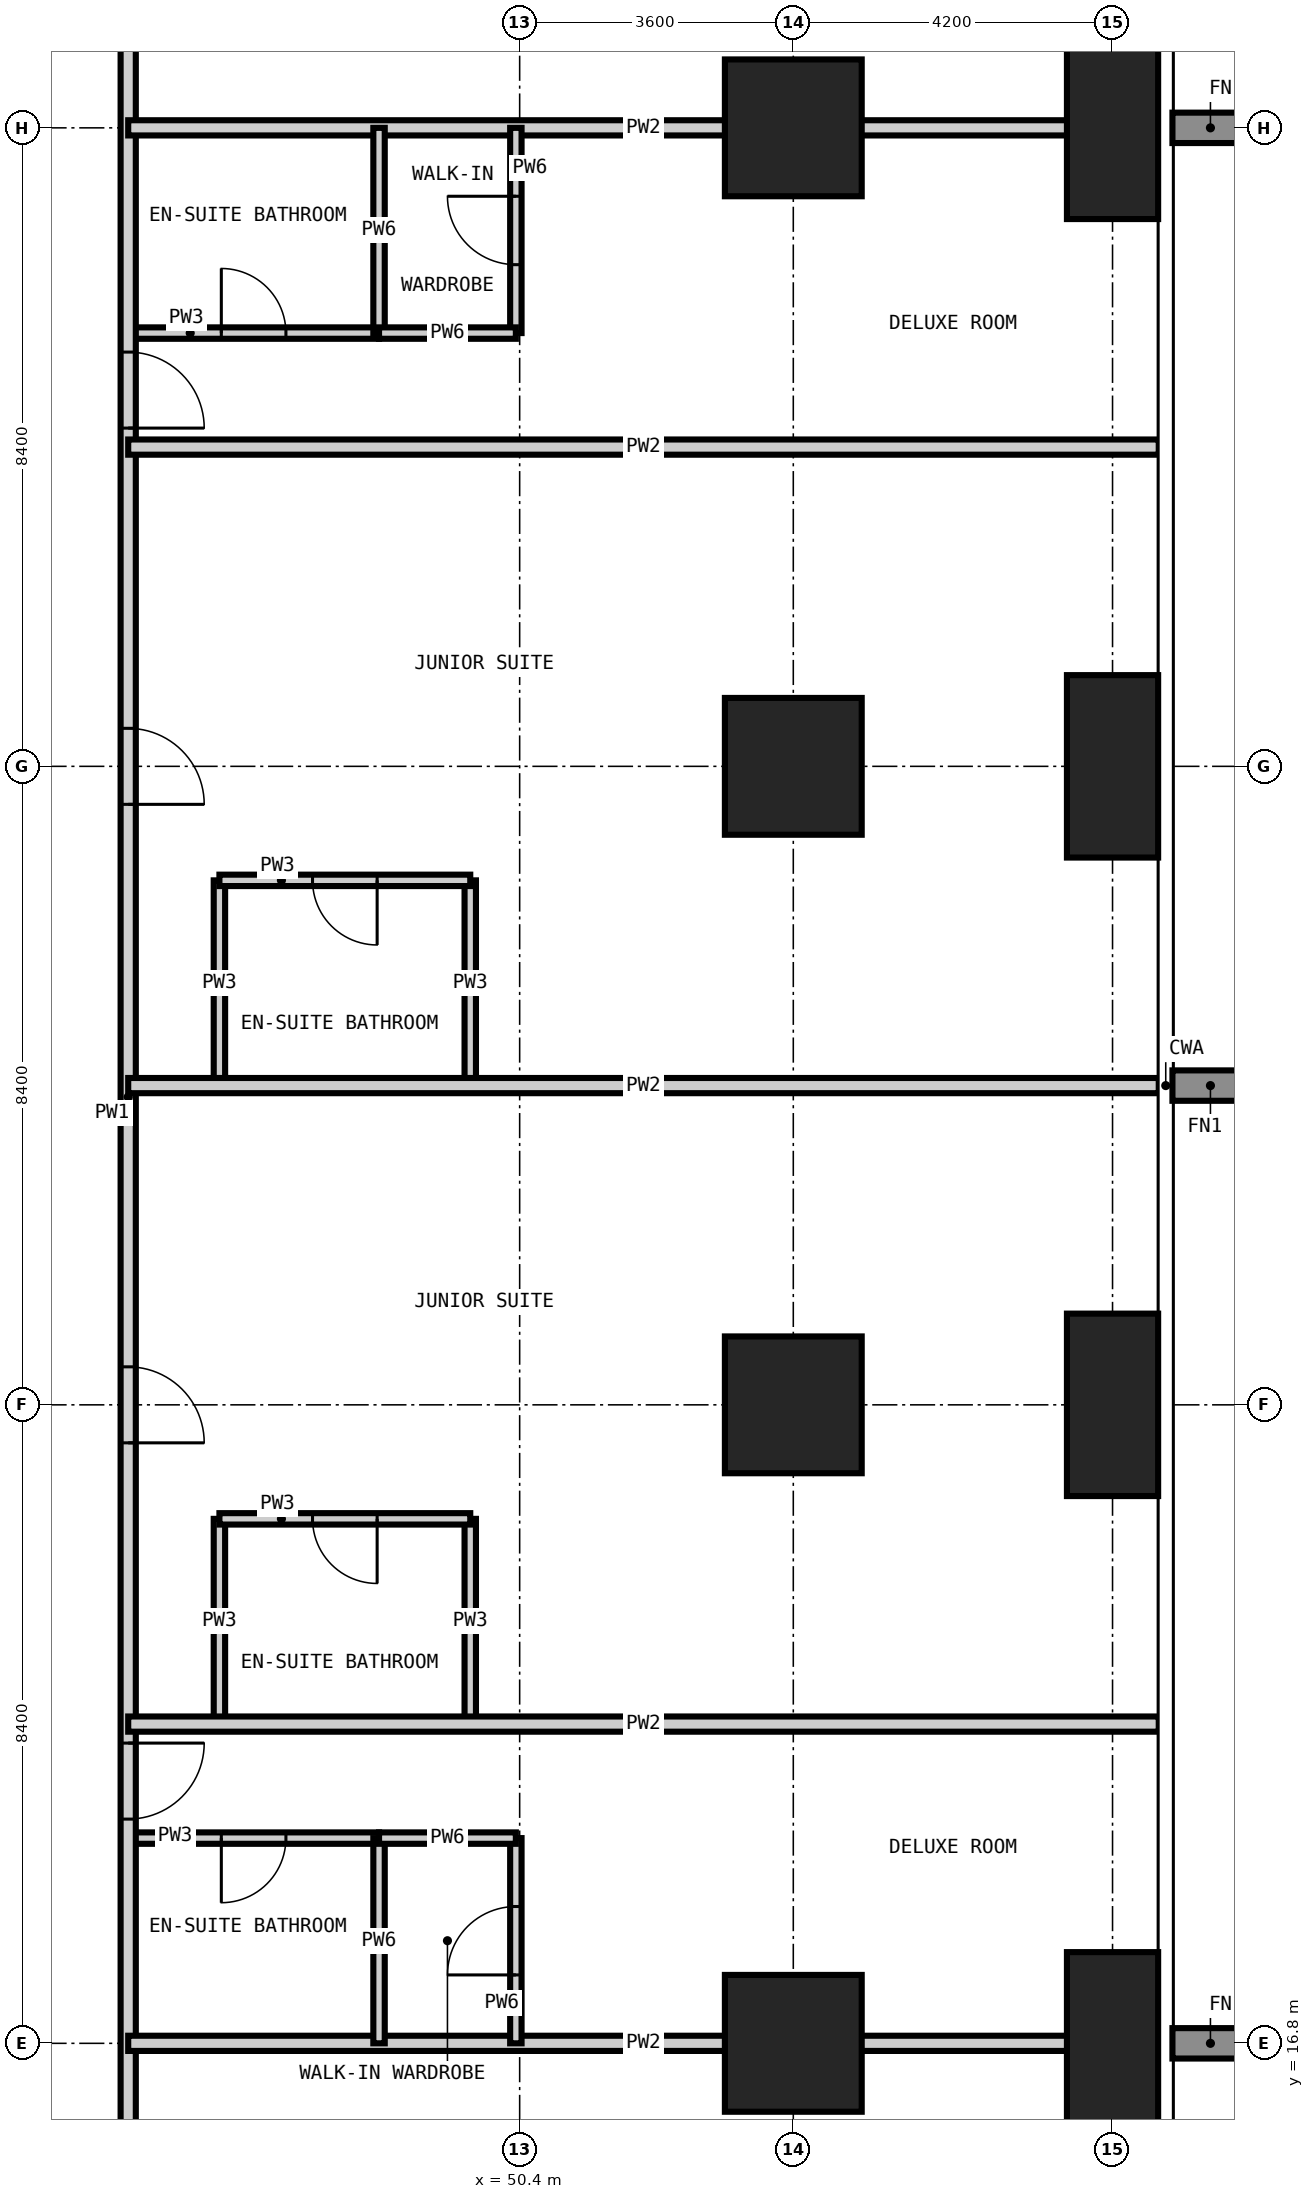
"""IFC4 building model, lengths in metres.
Left out: names, types, materials, properties, quantities, classifications, styles, units other than length and angle.
Written with IfcOpenShell. Run it as: python <this file> out.ifc"""

import sys

from ifc_helpers import new_model, si_unit, direction, frame, frame_2d, origin, origin_2d, place, context, subcontext, project, spatial, rectangle, extrude, element, fill, save


model = new_model("IFC4")
c1 = context("Model", 3, precision=1e-05, world=origin(), true_north=direction((0.0, 1.0)))
c2 = subcontext(c1, "Body", "Model", "MODEL_VIEW")
j1 = project(units=[si_unit("LENGTHUNIT", "METRE"), si_unit("PLANEANGLEUNIT", "RADIAN")], contexts=[c1])
p1 = place(None, origin())
s1 = spatial("IfcSite", under=j1, at=p1, CompositionType="ELEMENT")
p2 = place(p1, origin())
s2 = spatial("IfcBuilding", under=s1, at=p2, CompositionType="ELEMENT")
p3 = place(p2, frame((0.0, 0.0, 45.0)))
s3 = spatial("IfcBuildingStorey", under=s2, at=p3, CompositionType="ELEMENT", Elevation=45.0)
for number, where, z_axis, x_axis in (
    (1, (54.0, 16.8, -0.35), (0.0, 0.0, 1.0), (1.0, 0.0, 0.0)),
    (2, (54.0, 25.2, -0.35), (0.0, 0.0, 1.0), (1.0, 0.0, 0.0)),
    (3, (54.0, 33.6, -0.35), (0.0, 0.0, 1.0), (1.0, 0.0, 0.0)),
    (4, (54.0, 42.0, -0.35), (0.0, 0.0, 1.0), (1.0, 0.0, 0.0)),
):
    element("IfcColumn", number, at=place(p3, frame(where, z_axis=z_axis, x_axis=x_axis)), inside=s3, PredefinedType="COLUMN", context=c2, shape_type="SweptSolid", body=[
        extrude(rectangle(XDim=1.8, YDim=1.8, at=origin_2d()), origin(), (0.0, 0.0, 1.0), 3.6),
    ])
for number, where, z_axis, x_axis in (
    (5, (58.2, 16.8, -0.35), (0.0, 0.0, 1.0), (1.0, 0.0, 0.0)),
    (6, (58.2, 25.2, -0.35), (0.0, 0.0, 1.0), (1.0, 0.0, 0.0)),
    (7, (58.2, 33.6, -0.35), (0.0, 0.0, 1.0), (1.0, 0.0, 0.0)),
    (8, (58.2, 42.0, -0.35), (0.0, 0.0, 1.0), (1.0, 0.0, 0.0)),
):
    element("IfcColumn", number, at=place(p3, frame(where, z_axis=z_axis, x_axis=x_axis)), inside=s3, PredefinedType="COLUMN", context=c2, shape_type="SweptSolid", body=[
        extrude(rectangle(XDim=1.2, YDim=2.4, at=origin_2d()), origin(), (0.0, 0.0, 1.0), 3.6),
    ])
p4 = place(p3, frame((46.45, 21.0, 0.0), z_axis=(0.0, 0.0, 1.0), x_axis=(0.0, 1.0, 0.0)))
e9 = element("IfcWall", 9, at=p4, inside=s3, PredefinedType="PARTITIONING", context=c2, shape_type="SweptSolid", body=[
    extrude(rectangle(XDim=2.7, YDim=0.15, at=frame_2d((1.35, 0.0))), origin(), (0.0, 0.0, 1.0), 3.25),
])
p5 = place(p3, frame((46.45, 29.4, 0.0), z_axis=(0.0, 0.0, 1.0), x_axis=(0.0, 1.0, 0.0)))
e10 = element("IfcWall", 10, at=p5, inside=s3, PredefinedType="PARTITIONING", context=c2, shape_type="SweptSolid", body=[
    extrude(rectangle(XDim=2.7, YDim=0.15, at=frame_2d((1.35, 0.0))), origin(), (0.0, 0.0, 1.0), 3.25),
])
p6 = place(p3, frame((49.75, 21.0, 0.0), z_axis=(0.0, 0.0, 1.0), x_axis=(0.0, 1.0, 0.0)))
e11 = element("IfcWall", 11, at=p6, inside=s3, PredefinedType="PARTITIONING", context=c2, shape_type="SweptSolid", body=[
    extrude(rectangle(XDim=2.7, YDim=0.15, at=frame_2d((1.35, 0.0))), origin(), (0.0, 0.0, 1.0), 3.25),
])
p7 = place(p3, frame((49.75, 29.4, 0.0), z_axis=(0.0, 0.0, 1.0), x_axis=(0.0, 1.0, 0.0)))
e12 = element("IfcWall", 12, at=p7, inside=s3, PredefinedType="PARTITIONING", context=c2, shape_type="SweptSolid", body=[
    extrude(rectangle(XDim=2.7, YDim=0.15, at=frame_2d((1.35, 0.0))), origin(), (0.0, 0.0, 1.0), 3.25),
])
p8 = place(p3, frame((45.25, 19.5, 0.0), z_axis=(0.0, 0.0, 1.0), x_axis=(1.0, 0.0, 0.0)))
e13 = element("IfcWall", 13, at=p8, inside=s3, PredefinedType="PARTITIONING", context=c2, shape_type="SweptSolid", body=[
    extrude(rectangle(XDim=3.3, YDim=0.15, at=frame_2d((1.65, 0.0))), origin(), (0.0, 0.0, 1.0), 3.25),
])
p9 = place(p8, frame((1.225, 0.0, 0.0)))
e14 = element("IfcOpeningElement", 14, at=p9, cuts=e13, PredefinedType="OPENING", context=c2, shape_type="SweptSolid", body=[
    extrude(rectangle(XDim=0.85, YDim=2.1, at=frame_2d((0.425, 1.05))), frame((0.0, 0.085, 0.0), z_axis=(0.0, -1.0, 0.0), x_axis=(1.0, 0.0, 0.0)), (0.0, 0.0, 1.0), 0.17),
])
p10 = place(p3, frame((46.45, 23.7, 0.0), z_axis=(0.0, 0.0, 1.0), x_axis=(1.0, 0.0, 0.0)))
e15 = element("IfcWall", 15, at=p10, inside=s3, PredefinedType="PARTITIONING", context=c2, shape_type="SweptSolid", body=[
    extrude(rectangle(XDim=3.3, YDim=0.15, at=frame_2d((1.65, 0.0))), origin(), (0.0, 0.0, 1.0), 3.25),
])
p11 = place(p10, frame((1.225, 0.0, 0.0)))
e16 = element("IfcOpeningElement", 16, at=p11, cuts=e15, PredefinedType="OPENING", context=c2, shape_type="SweptSolid", body=[
    extrude(rectangle(XDim=0.85, YDim=2.1, at=frame_2d((0.425, 1.05))), frame((0.0, 0.085, 0.0), z_axis=(0.0, -1.0, 0.0), x_axis=(1.0, 0.0, 0.0)), (0.0, 0.0, 1.0), 0.17),
])
p12 = place(p3, frame((46.45, 32.1, 0.0), z_axis=(0.0, 0.0, 1.0), x_axis=(1.0, 0.0, 0.0)))
e17 = element("IfcWall", 17, at=p12, inside=s3, PredefinedType="PARTITIONING", context=c2, shape_type="SweptSolid", body=[
    extrude(rectangle(XDim=3.3, YDim=0.15, at=frame_2d((1.65, 0.0))), origin(), (0.0, 0.0, 1.0), 3.25),
])
p13 = place(p12, frame((1.225, 0.0, 0.0)))
e18 = element("IfcOpeningElement", 18, at=p13, cuts=e17, PredefinedType="OPENING", context=c2, shape_type="SweptSolid", body=[
    extrude(rectangle(XDim=0.85, YDim=2.1, at=frame_2d((0.425, 1.05))), frame((0.0, 0.085, 0.0), z_axis=(0.0, -1.0, 0.0), x_axis=(1.0, 0.0, 0.0)), (0.0, 0.0, 1.0), 0.17),
])
p14 = place(p3, frame((45.25, 39.3, 0.0), z_axis=(0.0, 0.0, 1.0), x_axis=(1.0, 0.0, 0.0)))
e19 = element("IfcWall", 19, at=p14, inside=s3, PredefinedType="PARTITIONING", context=c2, shape_type="SweptSolid", body=[
    extrude(rectangle(XDim=3.3, YDim=0.15, at=frame_2d((1.65, 0.0))), origin(), (0.0, 0.0, 1.0), 3.25),
])
p15 = place(p14, frame((1.225, 0.0, 0.0)))
e20 = element("IfcOpeningElement", 20, at=p15, cuts=e19, PredefinedType="OPENING", context=c2, shape_type="SweptSolid", body=[
    extrude(rectangle(XDim=0.85, YDim=2.1, at=frame_2d((0.425, 1.05))), frame((0.0, 0.085, 0.0), z_axis=(0.0, -1.0, 0.0), x_axis=(1.0, 0.0, 0.0)), (0.0, 0.0, 1.0), 0.17),
])
p16 = place(p3, frame((45.25, 45.55, 0.0), z_axis=(0.0, 0.0, 1.0), x_axis=(0.0, -1.0, 0.0)))
e21 = element("IfcWall", 21, at=p16, inside=s3, PredefinedType="PARTITIONING", context=c2, shape_type="SweptSolid", body=[
    extrude(rectangle(XDim=32.6, YDim=0.2, at=frame_2d((16.3, 0.0))), origin(), (0.0, 0.0, 1.0), 3.25),
])
p17 = place(p16, frame((24.8, 0.0, 0.0)))
e22 = element("IfcOpeningElement", 22, at=p17, cuts=e21, PredefinedType="OPENING", context=c2, shape_type="SweptSolid", body=[
    extrude(rectangle(XDim=1.0, YDim=2.2, at=frame_2d((0.5, 1.1))), frame((0.0, 0.11, 0.0), z_axis=(0.0, -1.0, 0.0), x_axis=(1.0, 0.0, 0.0)), (0.0, 0.0, 1.0), 0.22),
])
p18 = place(p16, frame((19.85, 0.0, 0.0)))
e23 = element("IfcOpeningElement", 23, at=p18, cuts=e21, PredefinedType="OPENING", context=c2, shape_type="SweptSolid", body=[
    extrude(rectangle(XDim=1.0, YDim=2.2, at=frame_2d((0.5, 1.1))), frame((0.0, 0.11, 0.0), z_axis=(0.0, -1.0, 0.0), x_axis=(1.0, 0.0, 0.0)), (0.0, 0.0, 1.0), 0.22),
])
p19 = place(p16, frame((11.45, 0.0, 0.0)))
e24 = element("IfcOpeningElement", 24, at=p19, cuts=e21, PredefinedType="OPENING", context=c2, shape_type="SweptSolid", body=[
    extrude(rectangle(XDim=1.0, YDim=2.2, at=frame_2d((0.5, 1.1))), frame((0.0, 0.11, 0.0), z_axis=(0.0, -1.0, 0.0), x_axis=(1.0, 0.0, 0.0)), (0.0, 0.0, 1.0), 0.22),
])
p20 = place(p16, frame((6.5, 0.0, 0.0)))
e25 = element("IfcOpeningElement", 25, at=p20, cuts=e21, PredefinedType="OPENING", context=c2, shape_type="SweptSolid", body=[
    extrude(rectangle(XDim=1.0, YDim=2.2, at=frame_2d((0.5, 1.1))), frame((0.0, 0.11, 0.0), z_axis=(0.0, -1.0, 0.0), x_axis=(1.0, 0.0, 0.0)), (0.0, 0.0, 1.0), 0.22),
])
p21 = place(p16, frame((30.175, 0.0, 0.0)))
e26 = element("IfcOpeningElement", 26, at=p21, cuts=e21, PredefinedType="OPENING", context=c2, shape_type="SweptSolid", body=[
    extrude(rectangle(XDim=1.0, YDim=2.2, at=frame_2d((0.5, 1.1))), frame((0.0, 0.11, 0.0), z_axis=(0.0, -1.0, 0.0), x_axis=(1.0, 0.0, 0.0)), (0.0, 0.0, 1.0), 0.22),
])
p22 = place(p16, frame((1.275, 0.0, 0.0)))
e27 = element("IfcOpeningElement", 27, at=p22, cuts=e21, PredefinedType="OPENING", context=c2, shape_type="SweptSolid", body=[
    extrude(rectangle(XDim=1.0, YDim=2.2, at=frame_2d((0.5, 1.1))), frame((0.0, 0.11, 0.0), z_axis=(0.0, -1.0, 0.0), x_axis=(1.0, 0.0, 0.0)), (0.0, 0.0, 1.0), 0.22),
])
for number, where, z_axis, x_axis in (
    (28, (45.25, 16.8, 0.0), (0.0, 0.0, 1.0), (1.0, 0.0, 0.0)),
    (29, (45.25, 21.0, 0.0), (0.0, 0.0, 1.0), (1.0, 0.0, 0.0)),
    (30, (45.25, 29.4, 0.0), (0.0, 0.0, 1.0), (1.0, 0.0, 0.0)),
    (31, (45.25, 37.8, 0.0), (0.0, 0.0, 1.0), (1.0, 0.0, 0.0)),
    (32, (45.25, 42.0, 0.0), (0.0, 0.0, 1.0), (1.0, 0.0, 0.0)),
):
    element("IfcWall", number, at=place(p3, frame(where, z_axis=z_axis, x_axis=x_axis)), inside=s3, PredefinedType="PARTITIONING", context=c2, shape_type="SweptSolid", body=[
        extrude(rectangle(XDim=13.558, YDim=0.2, at=frame_2d((6.779, 0.0))), origin(), (0.0, 0.0, 1.0), 3.25),
    ])
for number, where, z_axis, x_axis in (
    (33, (48.55, 16.8, 0.0), (0.0, 0.0, 1.0), (0.0, 1.0, 0.0)),
    (34, (48.55, 39.3, 0.0), (0.0, 0.0, 1.0), (0.0, 1.0, 0.0)),
):
    element("IfcWall", number, at=place(p3, frame(where, z_axis=z_axis, x_axis=x_axis)), inside=s3, PredefinedType="PARTITIONING", context=c2, shape_type="SweptSolid", body=[
        extrude(rectangle(XDim=2.7, YDim=0.15, at=frame_2d((1.35, 0.0))), origin(), (0.0, 0.0, 1.0), 3.25),
    ])
p23 = place(p3, frame((50.35, 16.8, 0.0), z_axis=(0.0, 0.0, 1.0), x_axis=(0.0, 1.0, 0.0)))
e35 = element("IfcWall", 35, at=p23, inside=s3, PredefinedType="PARTITIONING", context=c2, shape_type="SweptSolid", body=[
    extrude(rectangle(XDim=2.7, YDim=0.15, at=frame_2d((1.35, 0.0))), origin(), (0.0, 0.0, 1.0), 3.25),
])
p24 = place(p23, frame((0.9, 0.0, 0.0)))
e36 = element("IfcOpeningElement", 36, at=p24, cuts=e35, PredefinedType="OPENING", context=c2, shape_type="SweptSolid", body=[
    extrude(rectangle(XDim=0.9, YDim=2.1, at=frame_2d((0.45, 1.05))), frame((0.0, 0.085, 0.0), z_axis=(0.0, -1.0, 0.0), x_axis=(1.0, 0.0, 0.0)), (0.0, 0.0, 1.0), 0.17),
])
p25 = place(p3, frame((50.35, 39.3, 0.0), z_axis=(0.0, 0.0, 1.0), x_axis=(0.0, 1.0, 0.0)))
e37 = element("IfcWall", 37, at=p25, inside=s3, PredefinedType="PARTITIONING", context=c2, shape_type="SweptSolid", body=[
    extrude(rectangle(XDim=2.7, YDim=0.15, at=frame_2d((1.35, 0.0))), origin(), (0.0, 0.0, 1.0), 3.25),
])
p26 = place(p25, frame((0.9, 0.0, 0.0)))
e38 = element("IfcOpeningElement", 38, at=p26, cuts=e37, PredefinedType="OPENING", context=c2, shape_type="SweptSolid", body=[
    extrude(rectangle(XDim=0.9, YDim=2.1, at=frame_2d((0.45, 1.05))), frame((0.0, 0.085, 0.0), z_axis=(0.0, -1.0, 0.0), x_axis=(1.0, 0.0, 0.0)), (0.0, 0.0, 1.0), 0.17),
])
for number, where, z_axis, x_axis in (
    (39, (48.55, 19.5, 0.0), (0.0, 0.0, 1.0), (1.0, 0.0, 0.0)),
    (40, (48.55, 39.3, 0.0), (0.0, 0.0, 1.0), (1.0, 0.0, 0.0)),
):
    element("IfcWall", number, at=place(p3, frame(where, z_axis=z_axis, x_axis=x_axis)), inside=s3, PredefinedType="PARTITIONING", context=c2, shape_type="SweptSolid", body=[
        extrude(rectangle(XDim=1.8, YDim=0.15, at=frame_2d((0.9, 0.0))), origin(), (0.0, 0.0, 1.0), 3.25),
    ])
p27 = place(p17, origin())
e41 = element("IfcDoor", 41, at=p27, inside=s3, OperationType="SINGLE_SWING_LEFT", PredefinedType="DOOR", context=c2, shape_type="SweptSolid", body=[
    extrude(rectangle(XDim=1.0, YDim=2.2, at=frame_2d((0.5, 1.1))), frame((0.0, 0.025, 0.0), z_axis=(0.0, -1.0, 0.0), x_axis=(1.0, 0.0, 0.0)), (0.0, 0.0, 1.0), 0.05),
])
fill(e22, e41)
p28 = place(p9, frame((0.85, 0.0, 0.0), z_axis=(0.0, 0.0, 1.0), x_axis=(-1.0, 0.0, 0.0)))
e42 = element("IfcDoor", 42, at=p28, inside=s3, OperationType="SINGLE_SWING_RIGHT", PredefinedType="DOOR", context=c2, shape_type="SweptSolid", body=[
    extrude(rectangle(XDim=0.85, YDim=2.1, at=frame_2d((0.425, 1.05))), frame((0.0, 0.025, 0.0), z_axis=(0.0, -1.0, 0.0), x_axis=(1.0, 0.0, 0.0)), (0.0, 0.0, 1.0), 0.05),
])
fill(e14, e42)
p29 = place(p24, origin())
e43 = element("IfcDoor", 43, at=p29, inside=s3, OperationType="SINGLE_SWING_LEFT", PredefinedType="DOOR", context=c2, shape_type="SweptSolid", body=[
    extrude(rectangle(XDim=0.9, YDim=2.1, at=frame_2d((0.45, 1.05))), frame((0.0, 0.025, 0.0), z_axis=(0.0, -1.0, 0.0), x_axis=(1.0, 0.0, 0.0)), (0.0, 0.0, 1.0), 0.05),
])
fill(e36, e43)
p30 = place(p18, origin())
e44 = element("IfcDoor", 44, at=p30, inside=s3, OperationType="SINGLE_SWING_RIGHT", PredefinedType="DOOR", context=c2, shape_type="SweptSolid", body=[
    extrude(rectangle(XDim=1.0, YDim=2.2, at=frame_2d((0.5, 1.1))), frame((0.0, 0.025, 0.0), z_axis=(0.0, -1.0, 0.0), x_axis=(1.0, 0.0, 0.0)), (0.0, 0.0, 1.0), 0.05),
])
fill(e23, e44)
p31 = place(p11, frame((0.85, 0.0, 0.0), z_axis=(0.0, 0.0, 1.0), x_axis=(-1.0, 0.0, 0.0)))
e45 = element("IfcDoor", 45, at=p31, inside=s3, OperationType="SINGLE_SWING_LEFT", PredefinedType="DOOR", context=c2, shape_type="SweptSolid", body=[
    extrude(rectangle(XDim=0.85, YDim=2.1, at=frame_2d((0.425, 1.05))), frame((0.0, 0.025, 0.0), z_axis=(0.0, -1.0, 0.0), x_axis=(1.0, 0.0, 0.0)), (0.0, 0.0, 1.0), 0.05),
])
fill(e16, e45)
p32 = place(p19, origin())
e46 = element("IfcDoor", 46, at=p32, inside=s3, OperationType="SINGLE_SWING_RIGHT", PredefinedType="DOOR", context=c2, shape_type="SweptSolid", body=[
    extrude(rectangle(XDim=1.0, YDim=2.2, at=frame_2d((0.5, 1.1))), frame((0.0, 0.025, 0.0), z_axis=(0.0, -1.0, 0.0), x_axis=(1.0, 0.0, 0.0)), (0.0, 0.0, 1.0), 0.05),
])
fill(e24, e46)
p33 = place(p13, frame((0.85, 0.0, 0.0), z_axis=(0.0, 0.0, 1.0), x_axis=(-1.0, 0.0, 0.0)))
e47 = element("IfcDoor", 47, at=p33, inside=s3, OperationType="SINGLE_SWING_LEFT", PredefinedType="DOOR", context=c2, shape_type="SweptSolid", body=[
    extrude(rectangle(XDim=0.85, YDim=2.1, at=frame_2d((0.425, 1.05))), frame((0.0, 0.025, 0.0), z_axis=(0.0, -1.0, 0.0), x_axis=(1.0, 0.0, 0.0)), (0.0, 0.0, 1.0), 0.05),
])
fill(e18, e47)
p34 = place(p20, origin())
e48 = element("IfcDoor", 48, at=p34, inside=s3, OperationType="SINGLE_SWING_RIGHT", PredefinedType="DOOR", context=c2, shape_type="SweptSolid", body=[
    extrude(rectangle(XDim=1.0, YDim=2.2, at=frame_2d((0.5, 1.1))), frame((0.0, 0.025, 0.0), z_axis=(0.0, -1.0, 0.0), x_axis=(1.0, 0.0, 0.0)), (0.0, 0.0, 1.0), 0.05),
])
fill(e25, e48)
p35 = place(p15, origin())
e49 = element("IfcDoor", 49, at=p35, inside=s3, OperationType="SINGLE_SWING_LEFT", PredefinedType="DOOR", context=c2, shape_type="SweptSolid", body=[
    extrude(rectangle(XDim=0.85, YDim=2.1, at=frame_2d((0.425, 1.05))), frame((0.0, 0.025, 0.0), z_axis=(0.0, -1.0, 0.0), x_axis=(1.0, 0.0, 0.0)), (0.0, 0.0, 1.0), 0.05),
])
fill(e20, e49)
p36 = place(p26, origin())
e50 = element("IfcDoor", 50, at=p36, inside=s3, OperationType="SINGLE_SWING_RIGHT", PredefinedType="DOOR", context=c2, shape_type="SweptSolid", body=[
    extrude(rectangle(XDim=0.9, YDim=2.1, at=frame_2d((0.45, 1.05))), frame((0.0, 0.025, 0.0), z_axis=(0.0, -1.0, 0.0), x_axis=(1.0, 0.0, 0.0)), (0.0, 0.0, 1.0), 0.05),
])
fill(e38, e50)
save(model, sys.argv[1])
